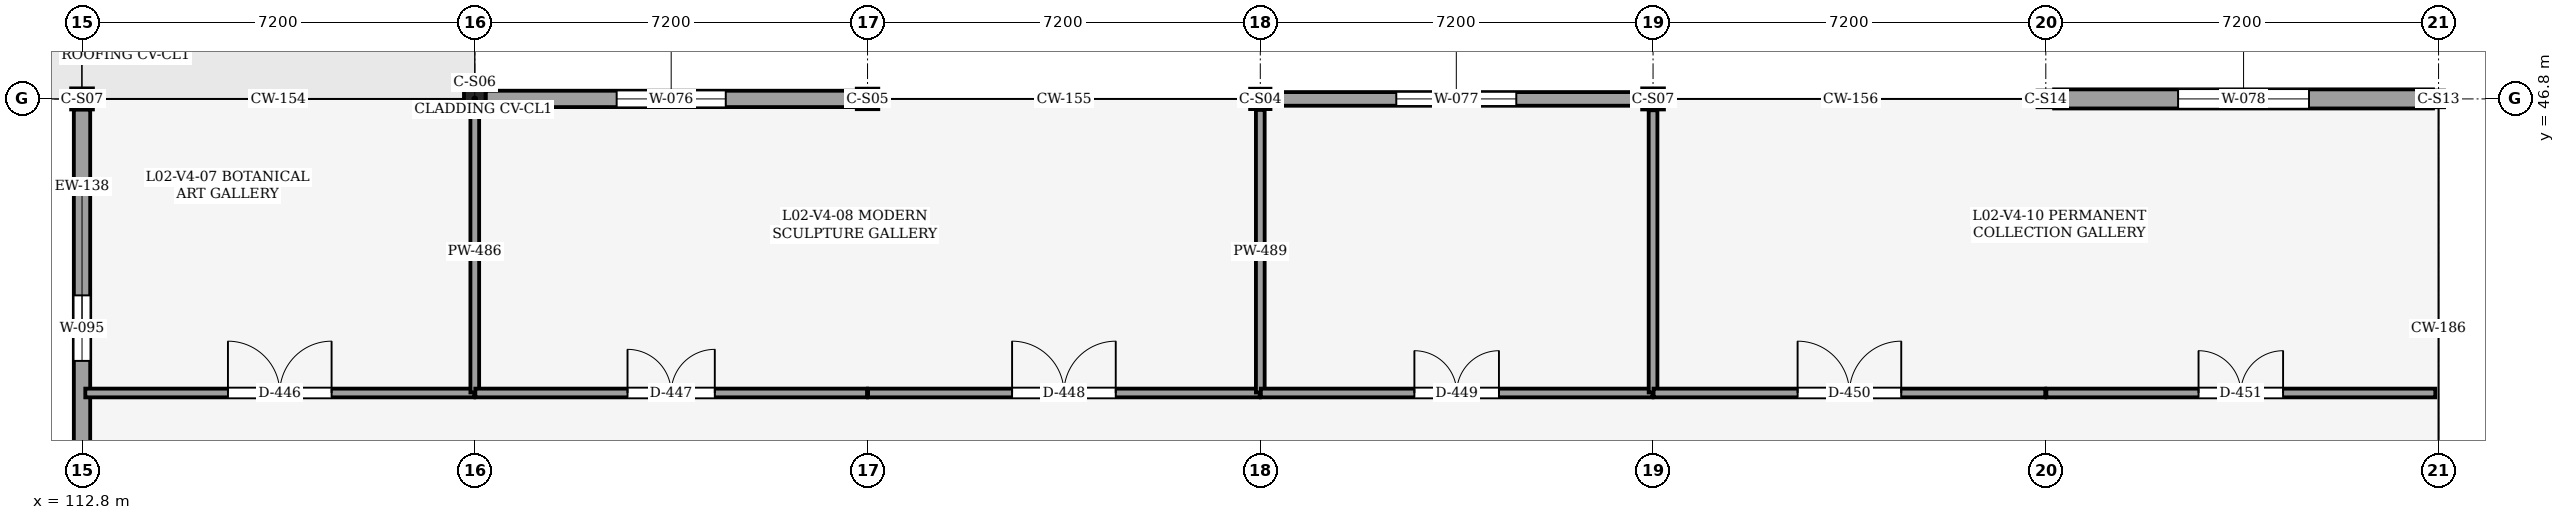
"""IFC4 building model, lengths in metres.
Left out: names, types, materials, properties, quantities, classifications, styles, units other than length and angle.
Written with IfcOpenShell. Run it as: python <this file> out.ifc"""

import sys

from ifc_helpers import new_model, si_unit, direction, frame, frame_2d, origin, origin_2d, place, context, subcontext, project, spatial, rectangle, hollow_rectangle, i_section, extrude, element, fill, save


model = new_model("IFC4")
c1 = context("Model", 3, precision=1e-05, world=origin(), true_north=direction((0.0, 1.0)))
c2 = subcontext(c1, "Body", "Model", "MODEL_VIEW")
j1 = project(units=[si_unit("LENGTHUNIT", "METRE"), si_unit("PLANEANGLEUNIT", "RADIAN")], contexts=[c1])
p1 = place(None, origin())
s1 = spatial("IfcSite", under=j1, at=p1, CompositionType="ELEMENT")
p2 = place(p1, origin())
s2 = spatial("IfcBuilding", under=s1, at=p2, CompositionType="ELEMENT")
p3 = place(p2, frame((0.0, 0.0, 10.2)))
s3 = spatial("IfcBuildingStorey", under=s2, at=p3, CompositionType="ELEMENT", Elevation=10.2)
p4 = place(p3, frame((112.8, 46.8, 0.0), z_axis=(0.0, 0.0, 1.0), x_axis=(1.0, 0.0, 0.0)))
e1 = element("IfcColumn", 1, at=p4, inside=s3, PredefinedType="COLUMN", context=c2, shape_type="SweptSolid", body=[
    extrude(i_section(OverallWidth=0.399, OverallDepth=0.386, WebThickness=0.021, FlangeThickness=0.033, FilletRadius=0.025, at=origin_2d()), origin(), (0.0, 0.0, 1.0), 4.8),
])
p5 = place(p3, frame((120.0, 46.8, 0.0), z_axis=(0.0, 0.0, 1.0), x_axis=(1.0, 0.0, 0.0)))
e2 = element("IfcColumn", 2, at=p5, inside=s3, PredefinedType="COLUMN", context=c2, shape_type="SweptSolid", body=[
    extrude(i_section(OverallWidth=0.396, OverallDepth=0.381, WebThickness=0.019, FlangeThickness=0.03, FilletRadius=0.025, at=origin_2d()), origin(), (0.0, 0.0, 1.0), 4.8),
])
p6 = place(p3, frame((127.2, 46.8, 0.0), z_axis=(0.0, 0.0, 1.0), x_axis=(1.0, 0.0, 0.0)))
e3 = element("IfcColumn", 3, at=p6, inside=s3, PredefinedType="COLUMN", context=c2, shape_type="SweptSolid", body=[
    extrude(i_section(OverallWidth=0.394, OverallDepth=0.376, WebThickness=0.017, FlangeThickness=0.028, FilletRadius=0.025, at=origin_2d()), origin(), (0.0, 0.0, 1.0), 4.8),
])
p7 = place(p3, frame((134.4, 46.8, 0.0), z_axis=(0.0, 0.0, 1.0), x_axis=(1.0, 0.0, 0.0)))
e4 = element("IfcColumn", 4, at=p7, inside=s3, PredefinedType="COLUMN", context=c2, shape_type="SweptSolid", body=[
    extrude(i_section(OverallWidth=0.373, OverallDepth=0.373, WebThickness=0.016, FlangeThickness=0.026, FilletRadius=0.025, at=origin_2d()), origin(), (0.0, 0.0, 1.0), 4.8),
])
p8 = place(p3, frame((141.6, 46.8, 0.0), z_axis=(0.0, 0.0, 1.0), x_axis=(1.0, 0.0, 0.0)))
e5 = element("IfcColumn", 5, at=p8, inside=s3, PredefinedType="COLUMN", context=c2, shape_type="SweptSolid", body=[
    extrude(i_section(OverallWidth=0.399, OverallDepth=0.386, WebThickness=0.021, FlangeThickness=0.033, FilletRadius=0.025, at=origin_2d()), origin(), (0.0, 0.0, 1.0), 4.8),
])
p9 = place(p3, frame((148.8, 46.8, 0.0), z_axis=(0.0, 0.0, 1.0), x_axis=(1.0, 0.0, 0.0)))
e6 = element("IfcColumn", 6, at=p9, inside=s3, PredefinedType="COLUMN", context=c2, shape_type="SweptSolid", body=[
    extrude(hollow_rectangle(XDim=0.305, YDim=0.305, WallThickness=0.016, OuterFilletRadius=0.032, at=origin_2d()), origin(), (0.0, 0.0, 1.0), 4.8),
])
p10 = place(p3, frame((156.0, 46.8, 0.0), z_axis=(0.0, 0.0, 1.0), x_axis=(1.0, 0.0, 0.0)))
e7 = element("IfcColumn", 7, at=p10, inside=s3, PredefinedType="COLUMN", context=c2, shape_type="SweptSolid", body=[
    extrude(hollow_rectangle(XDim=0.203, YDim=0.305, WallThickness=0.013, OuterFilletRadius=0.025, at=origin_2d()), origin(), (0.0, 0.0, 1.0), 4.8),
])
p11 = place(p3, frame((120.198, 46.8, 0.0), z_axis=(0.0, 0.0, 1.0), x_axis=(1.0, 0.0, 0.0)))
e8 = element("IfcWall", 8, at=p11, inside=s3, PredefinedType="SOLIDWALL", context=c2, shape_type="SweptSolid", body=[
    extrude(rectangle(XDim=6.805, YDim=0.3, at=frame_2d((3.402, 0.0))), origin(), (0.0, 0.0, 1.0), 3.991),
])
p12 = place(p11, frame((2.403, 0.0, 0.9)))
e9 = element("IfcOpeningElement", 9, at=p12, cuts=e8, PredefinedType="OPENING", context=c2, shape_type="SweptSolid", body=[
    extrude(rectangle(XDim=2.0, YDim=1.5, at=frame_2d((1.0, 0.75))), frame((0.0, 0.16, 0.0), z_axis=(0.0, -1.0, 0.0), x_axis=(1.0, 0.0, 0.0)), (0.0, 0.0, 1.0), 0.321),
])
p13 = place(p3, frame((134.586, 46.8, 0.0), z_axis=(0.0, 0.0, 1.0), x_axis=(1.0, 0.0, 0.0)))
e10 = element("IfcWall", 10, at=p13, inside=s3, PredefinedType="SOLIDWALL", context=c2, shape_type="SweptSolid", body=[
    extrude(rectangle(XDim=6.814, YDim=0.25, at=frame_2d((3.407, 0.0))), origin(), (0.0, 0.0, 1.0), 4.235),
])
p14 = place(p13, frame((2.307, 0.0, 0.9)))
e11 = element("IfcOpeningElement", 11, at=p14, cuts=e10, PredefinedType="OPENING", context=c2, shape_type="SweptSolid", body=[
    extrude(rectangle(XDim=2.2, YDim=1.5, at=frame_2d((1.1, 0.75))), frame((0.0, 0.135, 0.0), z_axis=(0.0, -1.0, 0.0), x_axis=(1.0, 0.0, 0.0)), (0.0, 0.0, 1.0), 0.271),
])
p15 = place(p3, frame((148.952, 46.8, 0.0), z_axis=(0.0, 0.0, 1.0), x_axis=(1.0, 0.0, 0.0)))
e12 = element("IfcWall", 12, at=p15, inside=s3, PredefinedType="SOLIDWALL", context=c2, shape_type="SweptSolid", body=[
    extrude(rectangle(XDim=6.946, YDim=0.35, at=frame_2d((3.473, 0.0))), origin(), (0.0, 0.0, 1.0), 3.991),
])
p16 = place(p15, frame((2.273, 0.0, 0.9)))
e13 = element("IfcOpeningElement", 13, at=p16, cuts=e12, PredefinedType="OPENING", context=c2, shape_type="SweptSolid", body=[
    extrude(rectangle(XDim=2.4, YDim=1.5, at=frame_2d((1.2, 0.75))), frame((0.0, 0.185, 0.0), z_axis=(0.0, -1.0, 0.0), x_axis=(1.0, 0.0, 0.0)), (0.0, 0.0, 1.0), 0.371),
])
p17 = place(p3, frame((112.8, 38.591, 0.0), z_axis=(0.0, 0.0, 1.0), x_axis=(0.0, 1.0, 0.0)))
e14 = element("IfcWall", 14, at=p17, inside=s3, PredefinedType="SOLIDWALL", context=c2, shape_type="SweptSolid", body=[
    extrude(rectangle(XDim=8.016, YDim=0.3, at=frame_2d((4.008, 0.0))), origin(), (0.0, 0.0, 1.0), 3.847),
])
p18 = place(p17, frame((3.408, 0.0, 0.9)))
e15 = element("IfcOpeningElement", 15, at=p18, cuts=e14, PredefinedType="OPENING", context=c2, shape_type="SweptSolid", body=[
    extrude(rectangle(XDim=1.2, YDim=1.5, at=frame_2d((0.6, 0.75))), frame((0.0, 0.16, 0.0), z_axis=(0.0, -1.0, 0.0), x_axis=(1.0, 0.0, 0.0)), (0.0, 0.0, 1.0), 0.321),
])
p19 = place(p3, frame((112.86, 41.41, 0.0), z_axis=(0.0, 0.0, 1.0), x_axis=(1.0, 0.0, 0.0)))
e16 = element("IfcWall", 16, at=p19, inside=s3, PredefinedType="PARTITIONING", context=c2, shape_type="SweptSolid", body=[
    extrude(rectangle(XDim=7.13, YDim=0.16, at=frame_2d((3.565, 0.0))), origin(), (0.0, 0.0, 1.0), 4.54),
])
p20 = place(p19, frame((2.615, 0.0, 0.0)))
e17 = element("IfcOpeningElement", 17, at=p20, cuts=e16, PredefinedType="OPENING", context=c2, shape_type="SweptSolid", body=[
    extrude(rectangle(XDim=1.9, YDim=2.45, at=frame_2d((0.95, 1.225))), frame((0.0, 0.09, 0.0), z_axis=(0.0, -1.0, 0.0), x_axis=(1.0, 0.0, 0.0)), (0.0, 0.0, 1.0), 0.18),
])
p21 = place(p3, frame((120.0, 41.42, 0.0), z_axis=(0.0, 0.0, 1.0), x_axis=(0.0, 1.0, 0.0)))
e18 = element("IfcWall", 18, at=p21, inside=s3, PredefinedType="PARTITIONING", context=c2, shape_type="SweptSolid", body=[
    extrude(rectangle(XDim=5.175, YDim=0.16, at=frame_2d((2.587, 0.0))), origin(), (0.0, 0.0, 1.0), 3.768),
])
p22 = place(p3, frame((120.01, 41.41, 0.0), z_axis=(0.0, 0.0, 1.0), x_axis=(1.0, 0.0, 0.0)))
e19 = element("IfcWall", 19, at=p22, inside=s3, PredefinedType="PARTITIONING", context=c2, shape_type="SweptSolid", body=[
    extrude(rectangle(XDim=7.18, YDim=0.16, at=frame_2d((3.59, 0.0))), origin(), (0.0, 0.0, 1.0), 4.54),
])
p23 = place(p22, frame((2.79, 0.0, 0.0)))
e20 = element("IfcOpeningElement", 20, at=p23, cuts=e19, PredefinedType="OPENING", context=c2, shape_type="SweptSolid", body=[
    extrude(rectangle(XDim=1.6, YDim=2.35, at=frame_2d((0.8, 1.175))), frame((0.0, 0.09, 0.0), z_axis=(0.0, -1.0, 0.0), x_axis=(1.0, 0.0, 0.0)), (0.0, 0.0, 1.0), 0.18),
])
p24 = place(p3, frame((127.21, 41.41, 0.0), z_axis=(0.0, 0.0, 1.0), x_axis=(1.0, 0.0, 0.0)))
e21 = element("IfcWall", 21, at=p24, inside=s3, PredefinedType="PARTITIONING", context=c2, shape_type="SweptSolid", body=[
    extrude(rectangle(XDim=7.18, YDim=0.16, at=frame_2d((3.59, 0.0))), origin(), (0.0, 0.0, 1.0), 4.54),
])
p25 = place(p24, frame((2.64, 0.0, 0.0)))
e22 = element("IfcOpeningElement", 22, at=p25, cuts=e21, PredefinedType="OPENING", context=c2, shape_type="SweptSolid", body=[
    extrude(rectangle(XDim=1.9, YDim=2.45, at=frame_2d((0.95, 1.225))), frame((0.0, 0.09, 0.0), z_axis=(0.0, -1.0, 0.0), x_axis=(1.0, 0.0, 0.0)), (0.0, 0.0, 1.0), 0.18),
])
p26 = place(p3, frame((134.4, 41.42, 0.0), z_axis=(0.0, 0.0, 1.0), x_axis=(0.0, 1.0, 0.0)))
e23 = element("IfcWall", 23, at=p26, inside=s3, PredefinedType="PARTITIONING", context=c2, shape_type="SweptSolid", body=[
    extrude(rectangle(XDim=5.178, YDim=0.16, at=frame_2d((2.589, 0.0))), origin(), (0.0, 0.0, 1.0), 3.613),
])
p27 = place(p3, frame((134.41, 41.41, 0.0), z_axis=(0.0, 0.0, 1.0), x_axis=(1.0, 0.0, 0.0)))
e24 = element("IfcWall", 24, at=p27, inside=s3, PredefinedType="PARTITIONING", context=c2, shape_type="SweptSolid", body=[
    extrude(rectangle(XDim=7.18, YDim=0.16, at=frame_2d((3.59, 0.0))), origin(), (0.0, 0.0, 1.0), 4.54),
])
p28 = place(p27, frame((2.815, 0.0, 0.0)))
e25 = element("IfcOpeningElement", 25, at=p28, cuts=e24, PredefinedType="OPENING", context=c2, shape_type="SweptSolid", body=[
    extrude(rectangle(XDim=1.55, YDim=2.3, at=frame_2d((0.775, 1.15))), frame((0.0, 0.09, 0.0), z_axis=(0.0, -1.0, 0.0), x_axis=(1.0, 0.0, 0.0)), (0.0, 0.0, 1.0), 0.18),
])
p29 = place(p3, frame((141.6, 41.42, 0.0), z_axis=(0.0, 0.0, 1.0), x_axis=(0.0, 1.0, 0.0)))
e26 = element("IfcWall", 26, at=p29, inside=s3, PredefinedType="PARTITIONING", context=c2, shape_type="SweptSolid", body=[
    extrude(rectangle(XDim=5.172, YDim=0.16, at=frame_2d((2.586, 0.0))), origin(), (0.0, 0.0, 1.0), 3.847),
])
p30 = place(p3, frame((141.61, 41.41, 0.0), z_axis=(0.0, 0.0, 1.0), x_axis=(1.0, 0.0, 0.0)))
e27 = element("IfcWall", 27, at=p30, inside=s3, PredefinedType="PARTITIONING", context=c2, shape_type="SweptSolid", body=[
    extrude(rectangle(XDim=7.18, YDim=0.16, at=frame_2d((3.59, 0.0))), origin(), (0.0, 0.0, 1.0), 4.54),
])
p31 = place(p30, frame((2.64, 0.0, 0.0)))
e28 = element("IfcOpeningElement", 28, at=p31, cuts=e27, PredefinedType="OPENING", context=c2, shape_type="SweptSolid", body=[
    extrude(rectangle(XDim=1.9, YDim=2.45, at=frame_2d((0.95, 1.225))), frame((0.0, 0.09, 0.0), z_axis=(0.0, -1.0, 0.0), x_axis=(1.0, 0.0, 0.0)), (0.0, 0.0, 1.0), 0.18),
])
p32 = place(p3, frame((148.81, 41.41, 0.0), z_axis=(0.0, 0.0, 1.0), x_axis=(1.0, 0.0, 0.0)))
e29 = element("IfcWall", 29, at=p32, inside=s3, PredefinedType="PARTITIONING", context=c2, shape_type="SweptSolid", body=[
    extrude(rectangle(XDim=7.13, YDim=0.16, at=frame_2d((3.565, 0.0))), origin(), (0.0, 0.0, 1.0), 4.54),
])
p33 = place(p32, frame((2.79, 0.0, 0.0)))
e30 = element("IfcOpeningElement", 30, at=p33, cuts=e29, PredefinedType="OPENING", context=c2, shape_type="SweptSolid", body=[
    extrude(rectangle(XDim=1.55, YDim=2.3, at=frame_2d((0.775, 1.15))), frame((0.0, 0.09, 0.0), z_axis=(0.0, -1.0, 0.0), x_axis=(1.0, 0.0, 0.0)), (0.0, 0.0, 1.0), 0.18),
])
p34 = place(p12, origin())
e31 = element("IfcWindow", 31, at=p34, inside=s3, PartitioningType="SINGLE_PANEL", PredefinedType="WINDOW", context=c2, shape_type="SweptSolid", body=[
    extrude(rectangle(XDim=2.0, YDim=1.5, at=frame_2d((1.0, 0.75))), frame((0.0, 0.03, 0.0), z_axis=(0.0, -1.0, 0.0), x_axis=(1.0, 0.0, 0.0)), (0.0, 0.0, 1.0), 0.06),
])
fill(e9, e31)
p35 = place(p14, origin())
e32 = element("IfcWindow", 32, at=p35, inside=s3, PartitioningType="SINGLE_PANEL", PredefinedType="WINDOW", context=c2, shape_type="SweptSolid", body=[
    extrude(rectangle(XDim=2.2, YDim=1.5, at=frame_2d((1.1, 0.75))), frame((0.0, 0.03, 0.0), z_axis=(0.0, -1.0, 0.0), x_axis=(1.0, 0.0, 0.0)), (0.0, 0.0, 1.0), 0.06),
])
fill(e11, e32)
p36 = place(p16, origin())
e33 = element("IfcWindow", 33, at=p36, inside=s3, PartitioningType="SINGLE_PANEL", PredefinedType="WINDOW", context=c2, shape_type="SweptSolid", body=[
    extrude(rectangle(XDim=2.4, YDim=1.5, at=frame_2d((1.2, 0.75))), frame((0.0, 0.03, 0.0), z_axis=(0.0, -1.0, 0.0), x_axis=(1.0, 0.0, 0.0)), (0.0, 0.0, 1.0), 0.06),
])
fill(e13, e33)
p37 = place(p18, origin())
e34 = element("IfcWindow", 34, at=p37, inside=s3, PartitioningType="SINGLE_PANEL", PredefinedType="WINDOW", context=c2, shape_type="SweptSolid", body=[
    extrude(rectangle(XDim=1.2, YDim=1.5, at=frame_2d((0.6, 0.75))), frame((0.0, 0.03, 0.0), z_axis=(0.0, -1.0, 0.0), x_axis=(1.0, 0.0, 0.0)), (0.0, 0.0, 1.0), 0.06),
])
fill(e15, e34)
p38 = place(p20, origin())
e35 = element("IfcDoor", 35, at=p38, inside=s3, OperationType="DOUBLE_DOOR_SINGLE_SWING", PredefinedType="DOOR", context=c2, shape_type="SweptSolid", body=[
    extrude(rectangle(XDim=1.9, YDim=2.45, at=frame_2d((0.95, 1.225))), frame((0.0, 0.025, 0.0), z_axis=(0.0, -1.0, 0.0), x_axis=(1.0, 0.0, 0.0)), (0.0, 0.0, 1.0), 0.05),
])
fill(e17, e35)
p39 = place(p23, origin())
e36 = element("IfcDoor", 36, at=p39, inside=s3, OperationType="DOUBLE_DOOR_SINGLE_SWING", PredefinedType="DOOR", context=c2, shape_type="SweptSolid", body=[
    extrude(rectangle(XDim=1.6, YDim=2.35, at=frame_2d((0.8, 1.175))), frame((0.0, 0.025, 0.0), z_axis=(0.0, -1.0, 0.0), x_axis=(1.0, 0.0, 0.0)), (0.0, 0.0, 1.0), 0.05),
])
fill(e20, e36)
p40 = place(p25, origin())
e37 = element("IfcDoor", 37, at=p40, inside=s3, OperationType="DOUBLE_DOOR_SINGLE_SWING", PredefinedType="DOOR", context=c2, shape_type="SweptSolid", body=[
    extrude(rectangle(XDim=1.9, YDim=2.45, at=frame_2d((0.95, 1.225))), frame((0.0, 0.025, 0.0), z_axis=(0.0, -1.0, 0.0), x_axis=(1.0, 0.0, 0.0)), (0.0, 0.0, 1.0), 0.05),
])
fill(e22, e37)
p41 = place(p28, origin())
e38 = element("IfcDoor", 38, at=p41, inside=s3, OperationType="DOUBLE_DOOR_SINGLE_SWING", PredefinedType="DOOR", context=c2, shape_type="SweptSolid", body=[
    extrude(rectangle(XDim=1.55, YDim=2.3, at=frame_2d((0.775, 1.15))), frame((0.0, 0.025, 0.0), z_axis=(0.0, -1.0, 0.0), x_axis=(1.0, 0.0, 0.0)), (0.0, 0.0, 1.0), 0.05),
])
fill(e25, e38)
p42 = place(p31, origin())
e39 = element("IfcDoor", 39, at=p42, inside=s3, OperationType="DOUBLE_DOOR_SINGLE_SWING", PredefinedType="DOOR", context=c2, shape_type="SweptSolid", body=[
    extrude(rectangle(XDim=1.9, YDim=2.45, at=frame_2d((0.95, 1.225))), frame((0.0, 0.025, 0.0), z_axis=(0.0, -1.0, 0.0), x_axis=(1.0, 0.0, 0.0)), (0.0, 0.0, 1.0), 0.05),
])
fill(e28, e39)
p43 = place(p33, origin())
e40 = element("IfcDoor", 40, at=p43, inside=s3, OperationType="DOUBLE_DOOR_SINGLE_SWING", PredefinedType="DOOR", context=c2, shape_type="SweptSolid", body=[
    extrude(rectangle(XDim=1.55, YDim=2.3, at=frame_2d((0.775, 1.15))), frame((0.0, 0.025, 0.0), z_axis=(0.0, -1.0, 0.0), x_axis=(1.0, 0.0, 0.0)), (0.0, 0.0, 1.0), 0.05),
])
fill(e30, e40)
save(model, sys.argv[1])
